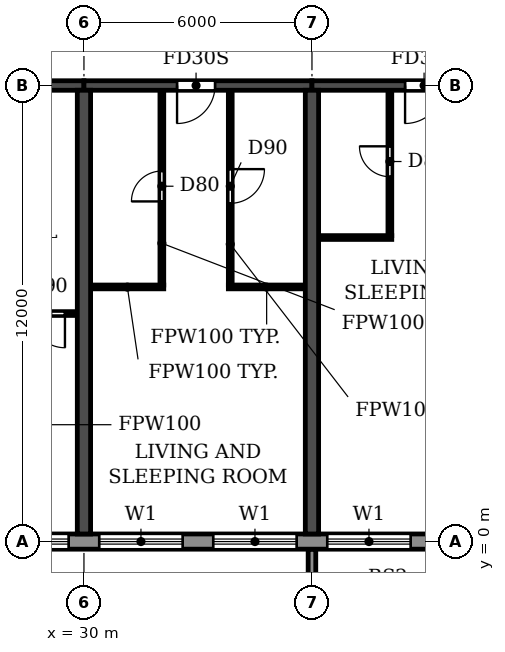
"""IFC4 building model, lengths in metres.
Left out: names, types, materials, properties, quantities, classifications, styles, units other than length and angle.
Written with IfcOpenShell. Run it as: python <this file> out.ifc"""

import sys

from ifc_helpers import new_model, si_unit, direction, frame, frame_2d, origin, place, context, subcontext, project, spatial, polyline, rectangle, outline, extrude, source, transform, mapped, element, fill, save


model = new_model("IFC4")
c1 = context("Model", 3, precision=1e-05, world=origin(), true_north=direction((0.0, 1.0)))
c2 = subcontext(c1, "Body", "Model", "MODEL_VIEW")
j1 = project(units=[si_unit("LENGTHUNIT", "METRE"), si_unit("PLANEANGLEUNIT", "RADIAN")], contexts=[c1])
p1 = place(None, origin())
s1 = spatial("IfcSite", under=j1, at=p1, CompositionType="ELEMENT")
p2 = place(p1, origin())
s2 = spatial("IfcBuilding", under=s1, at=p2, CompositionType="ELEMENT")
p3 = place(p2, frame((0.0, 0.0, 102.6)))
s3 = spatial("IfcBuildingStorey", under=s2, at=p3, CompositionType="ELEMENT", Elevation=102.6)
for number, where, z_axis, x_axis in (
    (1, (30.0, 0.2, 0.0), (0.0, 0.0, 1.0), (0.0, 1.0, 0.0)),
    (2, (36.0, 0.2, 0.0), (0.0, 0.0, 1.0), (0.0, 1.0, 0.0)),
):
    element("IfcWall", number, at=place(p3, frame(where, z_axis=z_axis, x_axis=x_axis)), inside=s3, PredefinedType="SHEAR", context=c2, shape_type="SweptSolid", body=[
        extrude(rectangle(XDim=11.675, YDim=0.35, at=frame_2d((5.837, 0.0))), origin(), (0.0, 0.0, 1.0), 3.0),
    ])
p4 = place(p3, frame((24.0, 12.0, 0.0), z_axis=(0.0, 0.0, 1.0), x_axis=(1.0, 0.0, 0.0)))
e3 = element("IfcWall", 3, at=p4, inside=s3, PredefinedType="SHEAR", context=c2, shape_type="SweptSolid", body=[
    extrude(rectangle(XDim=6.0, YDim=0.25, at=frame_2d((3.0, 0.0))), origin(), (0.0, 0.0, 1.0), 2.4),
])
p5 = place(p3, frame((30.0, 12.0, 0.0), z_axis=(0.0, 0.0, 1.0), x_axis=(1.0, 0.0, 0.0)))
e4 = element("IfcWall", 4, at=p5, inside=s3, PredefinedType="SHEAR", context=c2, shape_type="SweptSolid", body=[
    extrude(rectangle(XDim=6.0, YDim=0.25, at=frame_2d((3.0, 0.0))), origin(), (0.0, 0.0, 1.0), 2.4),
])
p6 = place(p5, frame((2.45, 0.0, 0.0)))
e5 = element("IfcOpeningElement", 5, at=p6, cuts=e4, PredefinedType="OPENING", context=c2, shape_type="SweptSolid", body=[
    extrude(rectangle(XDim=1.0, YDim=2.1, at=frame_2d((0.5, 1.05))), frame((0.0, 0.135, 0.0), z_axis=(0.0, -1.0, 0.0), x_axis=(1.0, 0.0, 0.0)), (0.0, 0.0, 1.0), 0.27),
])
p7 = place(p3, frame((36.0, 12.0, 0.0), z_axis=(0.0, 0.0, 1.0), x_axis=(1.0, 0.0, 0.0)))
e6 = element("IfcWall", 6, at=p7, inside=s3, PredefinedType="SHEAR", context=c2, shape_type="SweptSolid", body=[
    extrude(rectangle(XDim=6.0, YDim=0.25, at=frame_2d((3.0, 0.0))), origin(), (0.0, 0.0, 1.0), 2.4),
])
p8 = place(p7, frame((2.45, 0.0, 0.0)))
e7 = element("IfcOpeningElement", 7, at=p8, cuts=e6, PredefinedType="OPENING", context=c2, shape_type="SweptSolid", body=[
    extrude(rectangle(XDim=1.0, YDim=2.1, at=frame_2d((0.5, 1.05))), frame((0.0, 0.135, 0.0), z_axis=(0.0, -1.0, 0.0), x_axis=(1.0, 0.0, 0.0)), (0.0, 0.0, 1.0), 0.27),
])
p9 = place(p3, frame((10.683, 0.0, 0.0), z_axis=(0.0, 0.0, 1.0), x_axis=(1.0, 0.0, 0.0)))
e8 = element("IfcWall", 8, at=p9, inside=s3, PredefinedType="STANDARD", context=c2, shape_type="SweptSolid", body=[
    extrude(rectangle(XDim=80.634, YDim=0.4, at=frame_2d((40.317, 0.0))), origin(), (0.0, 0.0, 1.0), 3.0),
])
p10 = place(p9, frame((1.717, 0.0, 0.9)))
e9 = element("IfcOpeningElement", 9, at=p10, cuts=e8, PredefinedType="OPENING", context=c2, shape_type="SweptSolid", body=[
    extrude(rectangle(XDim=2.2, YDim=1.5, at=frame_2d((1.1, 0.75))), frame((0.0, 0.21, 0.0), z_axis=(0.0, -1.0, 0.0), x_axis=(1.0, 0.0, 0.0)), (0.0, 0.0, 1.0), 0.42),
])
p11 = place(p9, frame((4.917, 0.0, 0.0)))
e10 = element("IfcOpeningElement", 10, at=p11, cuts=e8, PredefinedType="OPENING", context=c2, shape_type="SweptSolid", body=[
    extrude(rectangle(XDim=1.8, YDim=2.4, at=frame_2d((0.9, 1.2))), frame((0.0, 0.21, 0.0), z_axis=(0.0, -1.0, 0.0), x_axis=(1.0, 0.0, 0.0)), (0.0, 0.0, 1.0), 0.42),
])
p12 = place(p9, frame((7.717, 0.0, 0.9)))
e11 = element("IfcOpeningElement", 11, at=p12, cuts=e8, PredefinedType="OPENING", context=c2, shape_type="SweptSolid", body=[
    extrude(rectangle(XDim=2.2, YDim=1.5, at=frame_2d((1.1, 0.75))), frame((0.0, 0.21, 0.0), z_axis=(0.0, -1.0, 0.0), x_axis=(1.0, 0.0, 0.0)), (0.0, 0.0, 1.0), 0.42),
])
p13 = place(p9, frame((10.717, 0.0, 0.9)))
e12 = element("IfcOpeningElement", 12, at=p13, cuts=e8, PredefinedType="OPENING", context=c2, shape_type="SweptSolid", body=[
    extrude(rectangle(XDim=2.2, YDim=1.5, at=frame_2d((1.1, 0.75))), frame((0.0, 0.21, 0.0), z_axis=(0.0, -1.0, 0.0), x_axis=(1.0, 0.0, 0.0)), (0.0, 0.0, 1.0), 0.42),
])
p14 = place(p9, frame((13.717, 0.0, 0.9)))
e13 = element("IfcOpeningElement", 13, at=p14, cuts=e8, PredefinedType="OPENING", context=c2, shape_type="SweptSolid", body=[
    extrude(rectangle(XDim=2.2, YDim=1.5, at=frame_2d((1.1, 0.75))), frame((0.0, 0.21, 0.0), z_axis=(0.0, -1.0, 0.0), x_axis=(1.0, 0.0, 0.0)), (0.0, 0.0, 1.0), 0.42),
])
p15 = place(p9, frame((16.717, 0.0, 0.9)))
e14 = element("IfcOpeningElement", 14, at=p15, cuts=e8, PredefinedType="OPENING", context=c2, shape_type="SweptSolid", body=[
    extrude(rectangle(XDim=2.2, YDim=1.5, at=frame_2d((1.1, 0.75))), frame((0.0, 0.21, 0.0), z_axis=(0.0, -1.0, 0.0), x_axis=(1.0, 0.0, 0.0)), (0.0, 0.0, 1.0), 0.42),
])
p16 = place(p9, frame((19.717, 0.0, 0.9)))
e15 = element("IfcOpeningElement", 15, at=p16, cuts=e8, PredefinedType="OPENING", context=c2, shape_type="SweptSolid", body=[
    extrude(rectangle(XDim=2.2, YDim=1.5, at=frame_2d((1.1, 0.75))), frame((0.0, 0.21, 0.0), z_axis=(0.0, -1.0, 0.0), x_axis=(1.0, 0.0, 0.0)), (0.0, 0.0, 1.0), 0.42),
])
p17 = place(p9, frame((22.717, 0.0, 0.9)))
e16 = element("IfcOpeningElement", 16, at=p17, cuts=e8, PredefinedType="OPENING", context=c2, shape_type="SweptSolid", body=[
    extrude(rectangle(XDim=2.2, YDim=1.5, at=frame_2d((1.1, 0.75))), frame((0.0, 0.21, 0.0), z_axis=(0.0, -1.0, 0.0), x_axis=(1.0, 0.0, 0.0)), (0.0, 0.0, 1.0), 0.42),
])
p18 = place(p9, frame((25.717, 0.0, 0.9)))
e17 = element("IfcOpeningElement", 17, at=p18, cuts=e8, PredefinedType="OPENING", context=c2, shape_type="SweptSolid", body=[
    extrude(rectangle(XDim=2.2, YDim=1.5, at=frame_2d((1.1, 0.75))), frame((0.0, 0.21, 0.0), z_axis=(0.0, -1.0, 0.0), x_axis=(1.0, 0.0, 0.0)), (0.0, 0.0, 1.0), 0.42),
])
p19 = place(p9, frame((28.917, 0.0, 0.0)))
e18 = element("IfcOpeningElement", 18, at=p19, cuts=e8, PredefinedType="OPENING", context=c2, shape_type="SweptSolid", body=[
    extrude(rectangle(XDim=1.8, YDim=2.4, at=frame_2d((0.9, 1.2))), frame((0.0, 0.21, 0.0), z_axis=(0.0, -1.0, 0.0), x_axis=(1.0, 0.0, 0.0)), (0.0, 0.0, 1.0), 0.42),
])
p20 = place(p9, frame((31.717, 0.0, 0.9)))
e19 = element("IfcOpeningElement", 19, at=p20, cuts=e8, PredefinedType="OPENING", context=c2, shape_type="SweptSolid", body=[
    extrude(rectangle(XDim=2.2, YDim=1.5, at=frame_2d((1.1, 0.75))), frame((0.0, 0.21, 0.0), z_axis=(0.0, -1.0, 0.0), x_axis=(1.0, 0.0, 0.0)), (0.0, 0.0, 1.0), 0.42),
])
p21 = place(p9, frame((34.717, 0.0, 0.9)))
e20 = element("IfcOpeningElement", 20, at=p21, cuts=e8, PredefinedType="OPENING", context=c2, shape_type="SweptSolid", body=[
    extrude(rectangle(XDim=2.2, YDim=1.5, at=frame_2d((1.1, 0.75))), frame((0.0, 0.21, 0.0), z_axis=(0.0, -1.0, 0.0), x_axis=(1.0, 0.0, 0.0)), (0.0, 0.0, 1.0), 0.42),
])
p22 = place(p9, frame((37.717, 0.0, 0.9)))
e21 = element("IfcOpeningElement", 21, at=p22, cuts=e8, PredefinedType="OPENING", context=c2, shape_type="SweptSolid", body=[
    extrude(rectangle(XDim=2.2, YDim=1.5, at=frame_2d((1.1, 0.75))), frame((0.0, 0.21, 0.0), z_axis=(0.0, -1.0, 0.0), x_axis=(1.0, 0.0, 0.0)), (0.0, 0.0, 1.0), 0.42),
])
p23 = place(p9, frame((40.717, 0.0, 0.9)))
e22 = element("IfcOpeningElement", 22, at=p23, cuts=e8, PredefinedType="OPENING", context=c2, shape_type="SweptSolid", body=[
    extrude(rectangle(XDim=2.2, YDim=1.5, at=frame_2d((1.1, 0.75))), frame((0.0, 0.21, 0.0), z_axis=(0.0, -1.0, 0.0), x_axis=(1.0, 0.0, 0.0)), (0.0, 0.0, 1.0), 0.42),
])
p24 = place(p9, frame((43.717, 0.0, 0.9)))
e23 = element("IfcOpeningElement", 23, at=p24, cuts=e8, PredefinedType="OPENING", context=c2, shape_type="SweptSolid", body=[
    extrude(rectangle(XDim=2.2, YDim=1.5, at=frame_2d((1.1, 0.75))), frame((0.0, 0.21, 0.0), z_axis=(0.0, -1.0, 0.0), x_axis=(1.0, 0.0, 0.0)), (0.0, 0.0, 1.0), 0.42),
])
p25 = place(p9, frame((46.717, 0.0, 0.9)))
e24 = element("IfcOpeningElement", 24, at=p25, cuts=e8, PredefinedType="OPENING", context=c2, shape_type="SweptSolid", body=[
    extrude(rectangle(XDim=2.2, YDim=1.5, at=frame_2d((1.1, 0.75))), frame((0.0, 0.21, 0.0), z_axis=(0.0, -1.0, 0.0), x_axis=(1.0, 0.0, 0.0)), (0.0, 0.0, 1.0), 0.42),
])
p26 = place(p9, frame((49.917, 0.0, 0.0)))
e25 = element("IfcOpeningElement", 25, at=p26, cuts=e8, PredefinedType="OPENING", context=c2, shape_type="SweptSolid", body=[
    extrude(rectangle(XDim=1.8, YDim=2.4, at=frame_2d((0.9, 1.2))), frame((0.0, 0.21, 0.0), z_axis=(0.0, -1.0, 0.0), x_axis=(1.0, 0.0, 0.0)), (0.0, 0.0, 1.0), 0.42),
])
p27 = place(p9, frame((52.717, 0.0, 0.9)))
e26 = element("IfcOpeningElement", 26, at=p27, cuts=e8, PredefinedType="OPENING", context=c2, shape_type="SweptSolid", body=[
    extrude(rectangle(XDim=2.2, YDim=1.5, at=frame_2d((1.1, 0.75))), frame((0.0, 0.21, 0.0), z_axis=(0.0, -1.0, 0.0), x_axis=(1.0, 0.0, 0.0)), (0.0, 0.0, 1.0), 0.42),
])
p28 = place(p9, frame((55.717, 0.0, 0.9)))
e27 = element("IfcOpeningElement", 27, at=p28, cuts=e8, PredefinedType="OPENING", context=c2, shape_type="SweptSolid", body=[
    extrude(rectangle(XDim=2.2, YDim=1.5, at=frame_2d((1.1, 0.75))), frame((0.0, 0.21, 0.0), z_axis=(0.0, -1.0, 0.0), x_axis=(1.0, 0.0, 0.0)), (0.0, 0.0, 1.0), 0.42),
])
p29 = place(p9, frame((58.717, 0.0, 0.9)))
e28 = element("IfcOpeningElement", 28, at=p29, cuts=e8, PredefinedType="OPENING", context=c2, shape_type="SweptSolid", body=[
    extrude(rectangle(XDim=2.2, YDim=1.5, at=frame_2d((1.1, 0.75))), frame((0.0, 0.21, 0.0), z_axis=(0.0, -1.0, 0.0), x_axis=(1.0, 0.0, 0.0)), (0.0, 0.0, 1.0), 0.42),
])
p30 = place(p9, frame((61.717, 0.0, 0.9)))
e29 = element("IfcOpeningElement", 29, at=p30, cuts=e8, PredefinedType="OPENING", context=c2, shape_type="SweptSolid", body=[
    extrude(rectangle(XDim=2.2, YDim=1.5, at=frame_2d((1.1, 0.75))), frame((0.0, 0.21, 0.0), z_axis=(0.0, -1.0, 0.0), x_axis=(1.0, 0.0, 0.0)), (0.0, 0.0, 1.0), 0.42),
])
p31 = place(p9, frame((64.717, 0.0, 0.9)))
e30 = element("IfcOpeningElement", 30, at=p31, cuts=e8, PredefinedType="OPENING", context=c2, shape_type="SweptSolid", body=[
    extrude(rectangle(XDim=2.2, YDim=1.5, at=frame_2d((1.1, 0.75))), frame((0.0, 0.21, 0.0), z_axis=(0.0, -1.0, 0.0), x_axis=(1.0, 0.0, 0.0)), (0.0, 0.0, 1.0), 0.42),
])
p32 = place(p9, frame((67.717, 0.0, 0.9)))
e31 = element("IfcOpeningElement", 31, at=p32, cuts=e8, PredefinedType="OPENING", context=c2, shape_type="SweptSolid", body=[
    extrude(rectangle(XDim=2.2, YDim=1.5, at=frame_2d((1.1, 0.75))), frame((0.0, 0.21, 0.0), z_axis=(0.0, -1.0, 0.0), x_axis=(1.0, 0.0, 0.0)), (0.0, 0.0, 1.0), 0.42),
])
p33 = place(p9, frame((70.717, 0.0, 0.9)))
e32 = element("IfcOpeningElement", 32, at=p33, cuts=e8, PredefinedType="OPENING", context=c2, shape_type="SweptSolid", body=[
    extrude(rectangle(XDim=2.2, YDim=1.5, at=frame_2d((1.1, 0.75))), frame((0.0, 0.21, 0.0), z_axis=(0.0, -1.0, 0.0), x_axis=(1.0, 0.0, 0.0)), (0.0, 0.0, 1.0), 0.42),
])
p34 = place(p9, frame((73.717, 0.0, 0.9)))
e33 = element("IfcOpeningElement", 33, at=p34, cuts=e8, PredefinedType="OPENING", context=c2, shape_type="SweptSolid", body=[
    extrude(rectangle(XDim=2.2, YDim=1.5, at=frame_2d((1.1, 0.75))), frame((0.0, 0.21, 0.0), z_axis=(0.0, -1.0, 0.0), x_axis=(1.0, 0.0, 0.0)), (0.0, 0.0, 1.0), 0.42),
])
p35 = place(p9, frame((76.917, 0.0, 0.0)))
e34 = element("IfcOpeningElement", 34, at=p35, cuts=e8, PredefinedType="OPENING", context=c2, shape_type="SweptSolid", body=[
    extrude(rectangle(XDim=1.8, YDim=2.4, at=frame_2d((0.9, 1.2))), frame((0.0, 0.21, 0.0), z_axis=(0.0, -1.0, 0.0), x_axis=(1.0, 0.0, 0.0)), (0.0, 0.0, 1.0), 0.42),
])
m1 = source(origin(), c2, "Body", "SweptSolid", [
    extrude(outline(polyline([(0.0, 0.0), (0.2, 0.0), (0.2, 1.65), (0.0, 1.65), (0.0, 0.0)])), origin(), (0.0, 0.0, 1.0), 3.1),
])
p36 = place(p3, frame((35.9, -1.85, 0.0)))
e35 = element("IfcWall", 35, at=p36, inside=s3, PredefinedType="STANDARD", context=c2, shape_type="MappedRepresentation", body=[
    mapped(m1, transform((0.0, 0.0, 0.0))),
])
p37 = place(p3, frame((24.185, 6.0, 0.0), z_axis=(0.0, 0.0, 1.0), x_axis=(1.0, 0.0, 0.0)))
e36 = element("IfcWall", 36, at=p37, inside=s3, PredefinedType="PARTITIONING", context=c2, shape_type="SweptSolid", body=[
    extrude(rectangle(XDim=5.63, YDim=0.1, at=frame_2d((2.815, 0.0))), origin(), (0.0, 0.0, 1.0), 3.0),
])
p38 = place(p37, frame((0.315, 0.0, 0.0)))
e37 = element("IfcOpeningElement", 37, at=p38, cuts=e36, PredefinedType="OPENING", context=c2, shape_type="SweptSolid", body=[
    extrude(rectangle(XDim=0.9, YDim=2.1, at=frame_2d((0.45, 1.05))), frame((0.0, 0.06, 0.0), z_axis=(0.0, -1.0, 0.0), x_axis=(1.0, 0.0, 0.0)), (0.0, 0.0, 1.0), 0.12),
])
p39 = place(p37, frame((4.415, 0.0, 0.0)))
e38 = element("IfcOpeningElement", 38, at=p39, cuts=e36, PredefinedType="OPENING", context=c2, shape_type="SweptSolid", body=[
    extrude(rectangle(XDim=0.9, YDim=2.1, at=frame_2d((0.45, 1.05))), frame((0.0, 0.06, 0.0), z_axis=(0.0, -1.0, 0.0), x_axis=(1.0, 0.0, 0.0)), (0.0, 0.0, 1.0), 0.12),
])
p40 = place(p3, frame((30.185, 6.7, 0.0), z_axis=(0.0, 0.0, 1.0), x_axis=(1.0, 0.0, 0.0)))
e39 = element("IfcWall", 39, at=p40, inside=s3, PredefinedType="PARTITIONING", context=c2, shape_type="SweptSolid", body=[
    extrude(rectangle(XDim=1.915, YDim=0.1, at=frame_2d((0.958, 0.0))), origin(), (0.0, 0.0, 1.0), 3.0),
])
p41 = place(p3, frame((33.8, 6.7, 0.0), z_axis=(0.0, 0.0, 1.0), x_axis=(1.0, 0.0, 0.0)))
e40 = element("IfcWall", 40, at=p41, inside=s3, PredefinedType="PARTITIONING", context=c2, shape_type="SweptSolid", body=[
    extrude(rectangle(XDim=2.015, YDim=0.1, at=frame_2d((1.007, 0.0))), origin(), (0.0, 0.0, 1.0), 3.0),
])
p42 = place(p3, frame((36.185, 8.0, 0.0), z_axis=(0.0, 0.0, 1.0), x_axis=(1.0, 0.0, 0.0)))
e41 = element("IfcWall", 41, at=p42, inside=s3, PredefinedType="PARTITIONING", context=c2, shape_type="SweptSolid", body=[
    extrude(rectangle(XDim=1.915, YDim=0.1, at=frame_2d((0.958, 0.0))), origin(), (0.0, 0.0, 1.0), 3.0),
])
p43 = place(p3, frame((32.05, 6.75, 0.0), z_axis=(0.0, 0.0, 1.0), x_axis=(0.0, 1.0, 0.0)))
e42 = element("IfcWall", 42, at=p43, inside=s3, PredefinedType="PARTITIONING", context=c2, shape_type="SweptSolid", body=[
    extrude(rectangle(XDim=5.115, YDim=0.1, at=frame_2d((2.558, 0.0))), origin(), (0.0, 0.0, 1.0), 3.0),
])
p44 = place(p43, frame((2.2, 0.0, 0.0)))
e43 = element("IfcOpeningElement", 43, at=p44, cuts=e42, PredefinedType="OPENING", context=c2, shape_type="SweptSolid", body=[
    extrude(rectangle(XDim=0.8, YDim=2.1, at=frame_2d((0.4, 1.05))), frame((0.0, 0.06, 0.0), z_axis=(0.0, -1.0, 0.0), x_axis=(1.0, 0.0, 0.0)), (0.0, 0.0, 1.0), 0.12),
])
p45 = place(p3, frame((33.85, 6.75, 0.0), z_axis=(0.0, 0.0, 1.0), x_axis=(0.0, 1.0, 0.0)))
e44 = element("IfcWall", 44, at=p45, inside=s3, PredefinedType="PARTITIONING", context=c2, shape_type="SweptSolid", body=[
    extrude(rectangle(XDim=5.115, YDim=0.1, at=frame_2d((2.558, 0.0))), origin(), (0.0, 0.0, 1.0), 3.0),
])
p46 = place(p45, frame((2.15, 0.0, 0.0)))
e45 = element("IfcOpeningElement", 45, at=p46, cuts=e44, PredefinedType="OPENING", context=c2, shape_type="SweptSolid", body=[
    extrude(rectangle(XDim=0.9, YDim=2.1, at=frame_2d((0.45, 1.05))), frame((0.0, 0.06, 0.0), z_axis=(0.0, -1.0, 0.0), x_axis=(1.0, 0.0, 0.0)), (0.0, 0.0, 1.0), 0.12),
])
p47 = place(p3, frame((38.05, 8.05, 0.0), z_axis=(0.0, 0.0, 1.0), x_axis=(0.0, 1.0, 0.0)))
e46 = element("IfcWall", 46, at=p47, inside=s3, PredefinedType="PARTITIONING", context=c2, shape_type="SweptSolid", body=[
    extrude(rectangle(XDim=3.815, YDim=0.1, at=frame_2d((1.907, 0.0))), origin(), (0.0, 0.0, 1.0), 3.0),
])
p48 = place(p47, frame((1.55, 0.0, 0.0)))
e47 = element("IfcOpeningElement", 47, at=p48, cuts=e46, PredefinedType="OPENING", context=c2, shape_type="SweptSolid", body=[
    extrude(rectangle(XDim=0.8, YDim=2.1, at=frame_2d((0.4, 1.05))), frame((0.0, 0.06, 0.0), z_axis=(0.0, -1.0, 0.0), x_axis=(1.0, 0.0, 0.0)), (0.0, 0.0, 1.0), 0.12),
])
p49 = place(p15, origin())
e48 = element("IfcWindow", 48, at=p49, inside=s3, PartitioningType="DOUBLE_PANEL_HORIZONTAL", PredefinedType="WINDOW", context=c2, shape_type="SweptSolid", body=[
    extrude(rectangle(XDim=2.2, YDim=1.5, at=frame_2d((1.1, 0.75))), frame((0.0, 0.03, 0.0), z_axis=(0.0, -1.0, 0.0), x_axis=(1.0, 0.0, 0.0)), (0.0, 0.0, 1.0), 0.06),
])
fill(e14, e48)
p50 = place(p16, origin())
e49 = element("IfcWindow", 49, at=p50, inside=s3, PartitioningType="DOUBLE_PANEL_HORIZONTAL", PredefinedType="WINDOW", context=c2, shape_type="SweptSolid", body=[
    extrude(rectangle(XDim=2.2, YDim=1.5, at=frame_2d((1.1, 0.75))), frame((0.0, 0.03, 0.0), z_axis=(0.0, -1.0, 0.0), x_axis=(1.0, 0.0, 0.0)), (0.0, 0.0, 1.0), 0.06),
])
fill(e15, e49)
p51 = place(p17, origin())
e50 = element("IfcWindow", 50, at=p51, inside=s3, PartitioningType="DOUBLE_PANEL_HORIZONTAL", PredefinedType="WINDOW", context=c2, shape_type="SweptSolid", body=[
    extrude(rectangle(XDim=2.2, YDim=1.5, at=frame_2d((1.1, 0.75))), frame((0.0, 0.03, 0.0), z_axis=(0.0, -1.0, 0.0), x_axis=(1.0, 0.0, 0.0)), (0.0, 0.0, 1.0), 0.06),
])
fill(e16, e50)
p52 = place(p18, origin())
e51 = element("IfcWindow", 51, at=p52, inside=s3, PartitioningType="DOUBLE_PANEL_HORIZONTAL", PredefinedType="WINDOW", context=c2, shape_type="SweptSolid", body=[
    extrude(rectangle(XDim=2.2, YDim=1.5, at=frame_2d((1.1, 0.75))), frame((0.0, 0.03, 0.0), z_axis=(0.0, -1.0, 0.0), x_axis=(1.0, 0.0, 0.0)), (0.0, 0.0, 1.0), 0.06),
])
fill(e17, e51)
p53 = place(p39, frame((0.9, 0.0, 0.0), z_axis=(0.0, 0.0, 1.0), x_axis=(-1.0, 0.0, 0.0)))
e52 = element("IfcDoor", 52, at=p53, inside=s3, OperationType="SINGLE_SWING_LEFT", PredefinedType="DOOR", context=c2, shape_type="SweptSolid", body=[
    extrude(rectangle(XDim=0.9, YDim=2.1, at=frame_2d((0.45, 1.05))), frame((0.0, 0.025, 0.0), z_axis=(0.0, -1.0, 0.0), x_axis=(1.0, 0.0, 0.0)), (0.0, 0.0, 1.0), 0.05),
])
fill(e38, e52)
p54 = place(p44, origin())
e53 = element("IfcDoor", 53, at=p54, inside=s3, OperationType="SINGLE_SWING_LEFT", PredefinedType="DOOR", context=c2, shape_type="SweptSolid", body=[
    extrude(rectangle(XDim=0.8, YDim=2.1, at=frame_2d((0.4, 1.05))), frame((0.0, 0.025, 0.0), z_axis=(0.0, -1.0, 0.0), x_axis=(1.0, 0.0, 0.0)), (0.0, 0.0, 1.0), 0.05),
])
fill(e43, e53)
p55 = place(p6, frame((1.0, 0.0, 0.0), z_axis=(0.0, 0.0, 1.0), x_axis=(-1.0, 0.0, 0.0)))
e54 = element("IfcDoor", 54, at=p55, inside=s3, OperationType="SINGLE_SWING_RIGHT", PredefinedType="DOOR", context=c2, shape_type="SweptSolid", body=[
    extrude(rectangle(XDim=1.0, YDim=2.1, at=frame_2d((0.5, 1.05))), frame((0.0, 0.025, 0.0), z_axis=(0.0, -1.0, 0.0), x_axis=(1.0, 0.0, 0.0)), (0.0, 0.0, 1.0), 0.05),
])
fill(e5, e54)
p56 = place(p46, frame((0.9, 0.0, 0.0), z_axis=(0.0, 0.0, 1.0), x_axis=(-1.0, 0.0, 0.0)))
e55 = element("IfcDoor", 55, at=p56, inside=s3, OperationType="SINGLE_SWING_LEFT", PredefinedType="DOOR", context=c2, shape_type="SweptSolid", body=[
    extrude(rectangle(XDim=0.9, YDim=2.1, at=frame_2d((0.45, 1.05))), frame((0.0, 0.025, 0.0), z_axis=(0.0, -1.0, 0.0), x_axis=(1.0, 0.0, 0.0)), (0.0, 0.0, 1.0), 0.05),
])
fill(e45, e55)
p57 = place(p48, origin())
e56 = element("IfcDoor", 56, at=p57, inside=s3, OperationType="SINGLE_SWING_RIGHT", PredefinedType="DOOR", context=c2, shape_type="SweptSolid", body=[
    extrude(rectangle(XDim=0.8, YDim=2.1, at=frame_2d((0.4, 1.05))), frame((0.0, 0.025, 0.0), z_axis=(0.0, -1.0, 0.0), x_axis=(1.0, 0.0, 0.0)), (0.0, 0.0, 1.0), 0.05),
])
fill(e47, e56)
p58 = place(p8, frame((1.0, 0.0, 0.0), z_axis=(0.0, 0.0, 1.0), x_axis=(-1.0, 0.0, 0.0)))
e57 = element("IfcDoor", 57, at=p58, inside=s3, OperationType="SINGLE_SWING_RIGHT", PredefinedType="DOOR", context=c2, shape_type="SweptSolid", body=[
    extrude(rectangle(XDim=1.0, YDim=2.1, at=frame_2d((0.5, 1.05))), frame((0.0, 0.025, 0.0), z_axis=(0.0, -1.0, 0.0), x_axis=(1.0, 0.0, 0.0)), (0.0, 0.0, 1.0), 0.05),
])
fill(e7, e57)
save(model, sys.argv[1])
